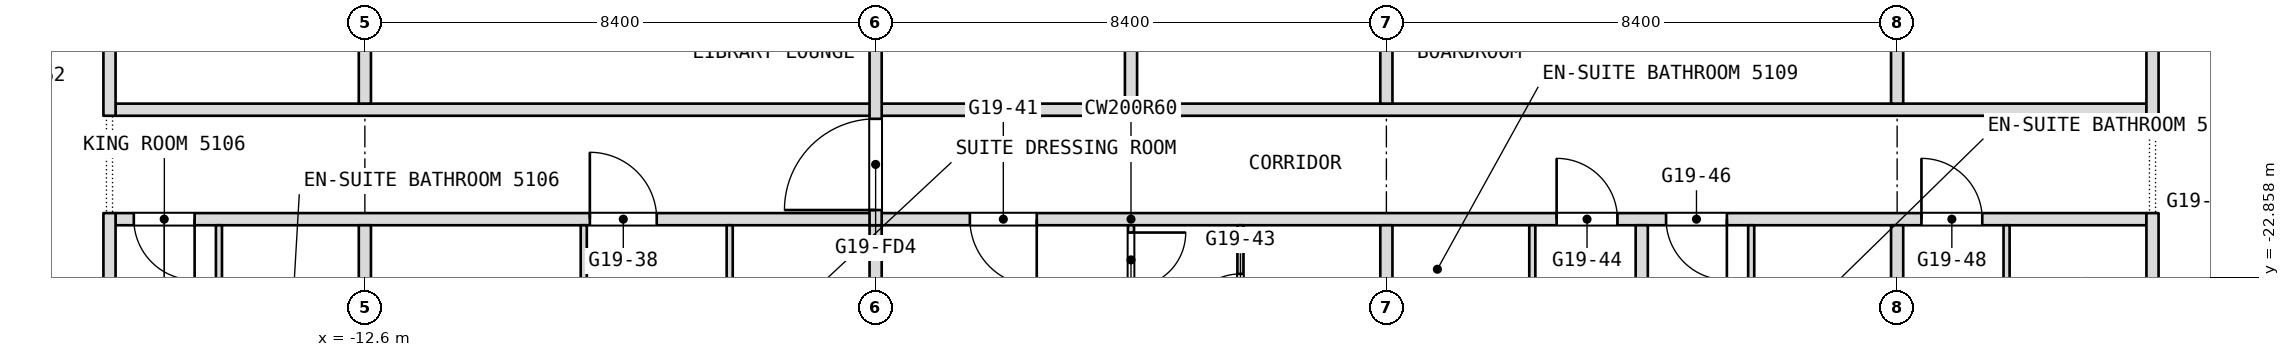
"""IFC4 building model, lengths in metres.
Left out: names, types, materials, properties, quantities, classifications, styles, units other than length and angle.
Written with IfcOpenShell. Run it as: python <this file> out.ifc"""

import sys

from ifc_helpers import new_model, si_unit, direction, frame, frame_2d, origin, place, context, subcontext, project, spatial, rectangle, extrude, element, fill, save


model = new_model("IFC4")
c1 = context("Model", 3, precision=1e-05, world=origin(), true_north=direction((0.0, 1.0)))
c2 = subcontext(c1, "Body", "Model", "MODEL_VIEW")
j1 = project(units=[si_unit("LENGTHUNIT", "METRE"), si_unit("PLANEANGLEUNIT", "RADIAN")], contexts=[c1])
p1 = place(None, origin())
s1 = spatial("IfcSite", under=j1, at=p1, CompositionType="ELEMENT")
p2 = place(p1, origin())
s2 = spatial("IfcBuilding", under=s1, at=p2, CompositionType="ELEMENT")
p3 = place(p2, frame((0.0, 0.0, 220.1)))
s3 = spatial("IfcBuildingStorey", under=s2, at=p3, CompositionType="ELEMENT", Elevation=220.1)
p4 = place(p3, frame((-16.7, -21.9, 0.0), z_axis=(0.0, 0.0, 1.0), x_axis=(1.0, 0.0, 0.0)))
e1 = element("IfcWall", 1, at=p4, inside=s3, PredefinedType="PARTITIONING", context=c2, shape_type="SweptSolid", body=[
    extrude(rectangle(XDim=33.4, YDim=0.2, at=frame_2d((16.7, 0.0))), origin(), (0.0, 0.0, 1.0), 3.34),
])
p5 = place(p4, frame((0.3, 0.0, 0.0)))
e2 = element("IfcOpeningElement", 2, at=p5, cuts=e1, PredefinedType="OPENING", context=c2, shape_type="SweptSolid", body=[
    extrude(rectangle(XDim=1.0, YDim=2.1, at=frame_2d((0.5, 1.05))), frame((0.0, 0.1, 0.0), z_axis=(0.0, -1.0, 0.0), x_axis=(1.0, 0.0, 0.0)), (0.0, 0.0, 1.0), 0.2),
])
p6 = place(p4, frame((7.8, 0.0, 0.0)))
e3 = element("IfcOpeningElement", 3, at=p6, cuts=e1, PredefinedType="OPENING", context=c2, shape_type="SweptSolid", body=[
    extrude(rectangle(XDim=1.1, YDim=2.1, at=frame_2d((0.55, 1.05))), frame((0.0, 0.1, 0.0), z_axis=(0.0, -1.0, 0.0), x_axis=(1.0, 0.0, 0.0)), (0.0, 0.0, 1.0), 0.2),
])
p7 = place(p4, frame((14.05, 0.0, 0.0)))
e4 = element("IfcOpeningElement", 4, at=p7, cuts=e1, PredefinedType="OPENING", context=c2, shape_type="SweptSolid", body=[
    extrude(rectangle(XDim=1.1, YDim=2.1, at=frame_2d((0.55, 1.05))), frame((0.0, 0.1, 0.0), z_axis=(0.0, -1.0, 0.0), x_axis=(1.0, 0.0, 0.0)), (0.0, 0.0, 1.0), 0.2),
])
p8 = place(p4, frame((23.7, 0.0, 0.0)))
e5 = element("IfcOpeningElement", 5, at=p8, cuts=e1, PredefinedType="OPENING", context=c2, shape_type="SweptSolid", body=[
    extrude(rectangle(XDim=1.0, YDim=2.1, at=frame_2d((0.5, 1.05))), frame((0.0, 0.1, 0.0), z_axis=(0.0, -1.0, 0.0), x_axis=(1.0, 0.0, 0.0)), (0.0, 0.0, 1.0), 0.2),
])
p9 = place(p4, frame((25.5, 0.0, 0.0)))
e6 = element("IfcOpeningElement", 6, at=p9, cuts=e1, PredefinedType="OPENING", context=c2, shape_type="SweptSolid", body=[
    extrude(rectangle(XDim=1.0, YDim=2.1, at=frame_2d((0.5, 1.05))), frame((0.0, 0.1, 0.0), z_axis=(0.0, -1.0, 0.0), x_axis=(1.0, 0.0, 0.0)), (0.0, 0.0, 1.0), 0.2),
])
p10 = place(p4, frame((29.7, 0.0, 0.0)))
e7 = element("IfcOpeningElement", 7, at=p10, cuts=e1, PredefinedType="OPENING", context=c2, shape_type="SweptSolid", body=[
    extrude(rectangle(XDim=1.0, YDim=2.1, at=frame_2d((0.5, 1.05))), frame((0.0, 0.1, 0.0), z_axis=(0.0, -1.0, 0.0), x_axis=(1.0, 0.0, 0.0)), (0.0, 0.0, 1.0), 0.2),
])
p11 = place(p3, frame((-16.7, -20.1, 0.0), z_axis=(0.0, 0.0, 1.0), x_axis=(1.0, 0.0, 0.0)))
e8 = element("IfcWall", 8, at=p11, inside=s3, PredefinedType="PARTITIONING", context=c2, shape_type="SweptSolid", body=[
    extrude(rectangle(XDim=33.4, YDim=0.2, at=frame_2d((16.7, 0.0))), origin(), (0.0, 0.0, 1.0), 3.34),
])
p12 = place(p3, frame((16.8, -27.229, 0.0), z_axis=(0.0, 0.0, 1.0), x_axis=(0.0, 1.0, 0.0)))
e9 = element("IfcWall", 9, at=p12, inside=s3, PredefinedType="PARTITIONING", context=c2, shape_type="SweptSolid", body=[
    extrude(rectangle(XDim=5.429, YDim=0.2, at=frame_2d((2.714, 0.0))), origin(), (0.0, 0.0, 1.0), 3.34),
])
p13 = place(p3, frame((16.8, -20.2, 0.0), z_axis=(0.0, 0.0, 1.0), x_axis=(0.0, 1.0, 0.0)))
e10 = element("IfcWall", 10, at=p13, inside=s3, PredefinedType="PARTITIONING", context=c2, shape_type="SweptSolid", body=[
    extrude(rectangle(XDim=6.8, YDim=0.2, at=frame_2d((3.4, 0.0))), origin(), (0.0, 0.0, 1.0), 3.34),
])
p14 = place(p3, frame((14.4, -24.95, 0.0), z_axis=(0.0, 0.0, 1.0), x_axis=(0.0, 1.0, 0.0)))
e11 = element("IfcWall", 11, at=p14, inside=s3, PredefinedType="PARTITIONING", context=c2, shape_type="SweptSolid", body=[
    extrude(rectangle(XDim=2.95, YDim=0.1, at=frame_2d((1.475, 0.0))), origin(), (0.0, 0.0, 1.0), 3.34),
])
p15 = place(p3, frame((12.6, -28.343, 0.0), z_axis=(0.0, 0.0, 1.0), x_axis=(0.0, 1.0, 0.0)))
e12 = element("IfcWall", 12, at=p15, inside=s3, PredefinedType="PARTITIONING", context=c2, shape_type="SweptSolid", body=[
    extrude(rectangle(XDim=6.343, YDim=0.2, at=frame_2d((3.171, 0.0))), origin(), (0.0, 0.0, 1.0), 3.34),
])
p16 = place(p3, frame((12.6, -20.0, 0.0), z_axis=(0.0, 0.0, 1.0), x_axis=(0.0, 1.0, 0.0)))
e13 = element("IfcWall", 13, at=p16, inside=s3, PredefinedType="PARTITIONING", context=c2, shape_type="SweptSolid", body=[
    extrude(rectangle(XDim=1.5, YDim=0.2, at=frame_2d((0.75, 0.0))), origin(), (0.0, 0.0, 1.0), 3.34),
])
p17 = place(p3, frame((10.2, -25.35, 0.0), z_axis=(0.0, 0.0, 1.0), x_axis=(0.0, 1.0, 0.0)))
e14 = element("IfcWall", 14, at=p17, inside=s3, PredefinedType="PARTITIONING", context=c2, shape_type="SweptSolid", body=[
    extrude(rectangle(XDim=3.35, YDim=0.1, at=frame_2d((1.675, 0.0))), origin(), (0.0, 0.0, 1.0), 3.34),
])
p18 = place(p3, frame((8.4, -28.9, 0.0), z_axis=(0.0, 0.0, 1.0), x_axis=(0.0, 1.0, 0.0)))
e15 = element("IfcWall", 15, at=p18, inside=s3, PredefinedType="PARTITIONING", context=c2, shape_type="SweptSolid", body=[
    extrude(rectangle(XDim=6.9, YDim=0.2, at=frame_2d((3.45, 0.0))), origin(), (0.0, 0.0, 1.0), 3.34),
])
p19 = place(p3, frame((6.6, -25.25, 0.0), z_axis=(0.0, 0.0, 1.0), x_axis=(0.0, 1.0, 0.0)))
e16 = element("IfcWall", 16, at=p19, inside=s3, PredefinedType="PARTITIONING", context=c2, shape_type="SweptSolid", body=[
    extrude(rectangle(XDim=3.25, YDim=0.1, at=frame_2d((1.625, 0.0))), origin(), (0.0, 0.0, 1.0), 3.34),
])
p20 = place(p19, frame((1.03, 0.0, 0.0)))
e17 = element("IfcOpeningElement", 17, at=p20, cuts=e16, PredefinedType="OPENING", context=c2, shape_type="SweptSolid", body=[
    extrude(rectangle(XDim=0.9, YDim=2.1, at=frame_2d((0.45, 1.05))), frame((0.0, 0.05, 0.0), z_axis=(0.0, -1.0, 0.0), x_axis=(1.0, 0.0, 0.0)), (0.0, 0.0, 1.0), 0.1),
])
p21 = place(p3, frame((4.2, -28.9, 0.0), z_axis=(0.0, 0.0, 1.0), x_axis=(0.0, 1.0, 0.0)))
e18 = element("IfcWall", 18, at=p21, inside=s3, PredefinedType="PARTITIONING", context=c2, shape_type="SweptSolid", body=[
    extrude(rectangle(XDim=6.9, YDim=0.2, at=frame_2d((3.45, 0.0))), origin(), (0.0, 0.0, 1.0), 3.34),
])
p22 = place(p3, frame((4.2, -20.0, 0.0), z_axis=(0.0, 0.0, 1.0), x_axis=(0.0, 1.0, 0.0)))
e19 = element("IfcWall", 19, at=p22, inside=s3, PredefinedType="PARTITIONING", context=c2, shape_type="SweptSolid", body=[
    extrude(rectangle(XDim=6.4, YDim=0.2, at=frame_2d((3.2, 0.0))), origin(), (0.0, 0.0, 1.0), 3.34),
])
p23 = place(p3, frame((1.8, -24.65, 0.0), z_axis=(0.0, 0.0, 1.0), x_axis=(0.0, 1.0, 0.0)))
e20 = element("IfcWall", 20, at=p23, inside=s3, PredefinedType="PARTITIONING", context=c2, shape_type="SweptSolid", body=[
    extrude(rectangle(XDim=2.65, YDim=0.1, at=frame_2d((1.325, 0.0))), origin(), (0.0, 0.0, 1.0), 3.34),
])
p24 = place(p23, frame((0.95, 0.0, 0.0)))
e21 = element("IfcOpeningElement", 21, at=p24, cuts=e20, PredefinedType="OPENING", context=c2, shape_type="SweptSolid", body=[
    extrude(rectangle(XDim=0.9, YDim=2.1, at=frame_2d((0.45, 1.05))), frame((0.0, 0.05, 0.0), z_axis=(0.0, -1.0, 0.0), x_axis=(1.0, 0.0, 0.0)), (0.0, 0.0, 1.0), 0.1),
])
p25 = place(p3, frame((0.0, -28.9, 0.0), z_axis=(0.0, 0.0, 1.0), x_axis=(0.0, 1.0, 0.0)))
e22 = element("IfcWall", 22, at=p25, inside=s3, PredefinedType="PARTITIONING", context=c2, shape_type="SweptSolid", body=[
    extrude(rectangle(XDim=6.9, YDim=0.1, at=frame_2d((3.45, 0.0))), origin(), (0.0, 0.0, 1.0), 3.34),
])
p26 = place(p25, frame((5.88, 0.0, 0.0)))
e23 = element("IfcOpeningElement", 23, at=p26, cuts=e22, PredefinedType="OPENING", context=c2, shape_type="SweptSolid", body=[
    extrude(rectangle(XDim=0.9, YDim=2.1, at=frame_2d((0.45, 1.05))), frame((0.0, 0.05, 0.0), z_axis=(0.0, -1.0, 0.0), x_axis=(1.0, 0.0, 0.0)), (0.0, 0.0, 1.0), 0.1),
])
p27 = place(p3, frame((0.0, -20.0, 0.0), z_axis=(0.0, 0.0, 1.0), x_axis=(0.0, 1.0, 0.0)))
e24 = element("IfcWall", 24, at=p27, inside=s3, PredefinedType="PARTITIONING", context=c2, shape_type="SweptSolid", body=[
    extrude(rectangle(XDim=6.4, YDim=0.2, at=frame_2d((3.2, 0.0))), origin(), (0.0, 0.0, 1.0), 3.34),
])
p28 = place(p3, frame((-4.2, -28.9, 0.0), z_axis=(0.0, 0.0, 1.0), x_axis=(0.0, 1.0, 0.0)))
e25 = element("IfcWall", 25, at=p28, inside=s3, PredefinedType="PARTITIONING", context=c2, shape_type="SweptSolid", body=[
    extrude(rectangle(XDim=6.9, YDim=0.2, at=frame_2d((3.45, 0.0))), origin(), (0.0, 0.0, 1.0), 3.34),
])
p29 = place(p3, frame((-4.2, -22.0, 0.0), z_axis=(0.0, 0.0, 1.0), x_axis=(0.0, 1.0, 0.0)))
e26 = element("IfcWall", 26, at=p29, inside=s3, PredefinedType="PARTITIONING", context=c2, shape_type="SweptSolid", body=[
    extrude(rectangle(XDim=8.4, YDim=0.2, at=frame_2d((4.2, 0.0))), origin(), (0.0, 0.0, 1.0), 3.34),
])
p30 = place(p29, frame((0.25, 0.0, 0.0)))
e27 = element("IfcOpeningElement", 27, at=p30, cuts=e26, PredefinedType="OPENING", context=c2, shape_type="SweptSolid", body=[
    extrude(rectangle(XDim=1.5, YDim=2.1, at=frame_2d((0.75, 1.05))), frame((0.0, 0.1, 0.0), z_axis=(0.0, -1.0, 0.0), x_axis=(1.0, 0.0, 0.0)), (0.0, 0.0, 1.0), 0.2),
])
p31 = place(p3, frame((-6.6, -25.55, 0.0), z_axis=(0.0, 0.0, 1.0), x_axis=(0.0, 1.0, 0.0)))
e28 = element("IfcWall", 28, at=p31, inside=s3, PredefinedType="PARTITIONING", context=c2, shape_type="SweptSolid", body=[
    extrude(rectangle(XDim=3.55, YDim=0.1, at=frame_2d((1.775, 0.0))), origin(), (0.0, 0.0, 1.0), 3.34),
])
p32 = place(p3, frame((-9.0, -25.45, 0.0), z_axis=(0.0, 0.0, 1.0), x_axis=(0.0, 1.0, 0.0)))
e29 = element("IfcWall", 29, at=p32, inside=s3, PredefinedType="PARTITIONING", context=c2, shape_type="SweptSolid", body=[
    extrude(rectangle(XDim=3.45, YDim=0.1, at=frame_2d((1.725, 0.0))), origin(), (0.0, 0.0, 1.0), 3.34),
])
p33 = place(p32, frame((0.94, 0.0, 0.0)))
e30 = element("IfcOpeningElement", 30, at=p33, cuts=e29, PredefinedType="OPENING", context=c2, shape_type="SweptSolid", body=[
    extrude(rectangle(XDim=0.9, YDim=2.1, at=frame_2d((0.45, 1.05))), frame((0.0, 0.05, 0.0), z_axis=(0.0, -1.0, 0.0), x_axis=(1.0, 0.0, 0.0)), (0.0, 0.0, 1.0), 0.1),
])
p34 = place(p3, frame((-12.6, -28.343, 0.0), z_axis=(0.0, 0.0, 1.0), x_axis=(0.0, 1.0, 0.0)))
e31 = element("IfcWall", 31, at=p34, inside=s3, PredefinedType="PARTITIONING", context=c2, shape_type="SweptSolid", body=[
    extrude(rectangle(XDim=6.343, YDim=0.2, at=frame_2d((3.171, 0.0))), origin(), (0.0, 0.0, 1.0), 3.34),
])
p35 = place(p3, frame((-12.6, -20.0, 0.0), z_axis=(0.0, 0.0, 1.0), x_axis=(0.0, 1.0, 0.0)))
e32 = element("IfcWall", 32, at=p35, inside=s3, PredefinedType="PARTITIONING", context=c2, shape_type="SweptSolid", body=[
    extrude(rectangle(XDim=1.5, YDim=0.2, at=frame_2d((0.75, 0.0))), origin(), (0.0, 0.0, 1.0), 3.34),
])
p36 = place(p3, frame((-15.0, -25.85, 0.0), z_axis=(0.0, 0.0, 1.0), x_axis=(0.0, 1.0, 0.0)))
e33 = element("IfcWall", 33, at=p36, inside=s3, PredefinedType="PARTITIONING", context=c2, shape_type="SweptSolid", body=[
    extrude(rectangle(XDim=3.85, YDim=0.1, at=frame_2d((1.925, 0.0))), origin(), (0.0, 0.0, 1.0), 3.34),
])
p37 = place(p3, frame((-16.8, -27.229, 0.0), z_axis=(0.0, 0.0, 1.0), x_axis=(0.0, 1.0, 0.0)))
e34 = element("IfcWall", 34, at=p37, inside=s3, PredefinedType="PARTITIONING", context=c2, shape_type="SweptSolid", body=[
    extrude(rectangle(XDim=5.429, YDim=0.2, at=frame_2d((2.714, 0.0))), origin(), (0.0, 0.0, 1.0), 3.34),
])
p38 = place(p3, frame((-16.8, -20.2, 0.0), z_axis=(0.0, 0.0, 1.0), x_axis=(0.0, 1.0, 0.0)))
e35 = element("IfcWall", 35, at=p38, inside=s3, PredefinedType="PARTITIONING", context=c2, shape_type="SweptSolid", body=[
    extrude(rectangle(XDim=6.8, YDim=0.2, at=frame_2d((3.4, 0.0))), origin(), (0.0, 0.0, 1.0), 3.34),
])
p39 = place(p5, origin())
e36 = element("IfcDoor", 36, at=p39, inside=s3, OperationType="SINGLE_SWING_RIGHT", PredefinedType="DOOR", context=c2, shape_type="SweptSolid", body=[
    extrude(rectangle(XDim=1.0, YDim=2.1, at=frame_2d((0.5, 1.05))), frame((0.0, 0.025, 0.0), z_axis=(0.0, -1.0, 0.0), x_axis=(1.0, 0.0, 0.0)), (0.0, 0.0, 1.0), 0.05),
])
fill(e2, e36)
p40 = place(p6, origin())
e37 = element("IfcDoor", 37, at=p40, inside=s3, OperationType="SINGLE_SWING_RIGHT", PredefinedType="DOOR", context=c2, shape_type="SweptSolid", body=[
    extrude(rectangle(XDim=1.1, YDim=2.1, at=frame_2d((0.55, 1.05))), frame((0.0, 0.025, 0.0), z_axis=(0.0, -1.0, 0.0), x_axis=(1.0, 0.0, 0.0)), (0.0, 0.0, 1.0), 0.05),
])
fill(e3, e37)
p41 = place(p7, origin())
e38 = element("IfcDoor", 38, at=p41, inside=s3, OperationType="SINGLE_SWING_LEFT", PredefinedType="DOOR", context=c2, shape_type="SweptSolid", body=[
    extrude(rectangle(XDim=1.1, YDim=2.1, at=frame_2d((0.55, 1.05))), frame((0.0, 0.025, 0.0), z_axis=(0.0, -1.0, 0.0), x_axis=(1.0, 0.0, 0.0)), (0.0, 0.0, 1.0), 0.05),
])
fill(e4, e38)
p42 = place(p8, origin())
e39 = element("IfcDoor", 39, at=p42, inside=s3, OperationType="SINGLE_SWING_RIGHT", PredefinedType="DOOR", context=c2, shape_type="SweptSolid", body=[
    extrude(rectangle(XDim=1.0, YDim=2.1, at=frame_2d((0.5, 1.05))), frame((0.0, 0.025, 0.0), z_axis=(0.0, -1.0, 0.0), x_axis=(1.0, 0.0, 0.0)), (0.0, 0.0, 1.0), 0.05),
])
fill(e5, e39)
p43 = place(p9, origin())
e40 = element("IfcDoor", 40, at=p43, inside=s3, OperationType="SINGLE_SWING_RIGHT", PredefinedType="DOOR", context=c2, shape_type="SweptSolid", body=[
    extrude(rectangle(XDim=1.0, YDim=2.1, at=frame_2d((0.5, 1.05))), frame((0.0, 0.025, 0.0), z_axis=(0.0, -1.0, 0.0), x_axis=(1.0, 0.0, 0.0)), (0.0, 0.0, 1.0), 0.05),
])
fill(e6, e40)
p44 = place(p10, origin())
e41 = element("IfcDoor", 41, at=p44, inside=s3, OperationType="SINGLE_SWING_RIGHT", PredefinedType="DOOR", context=c2, shape_type="SweptSolid", body=[
    extrude(rectangle(XDim=1.0, YDim=2.1, at=frame_2d((0.5, 1.05))), frame((0.0, 0.025, 0.0), z_axis=(0.0, -1.0, 0.0), x_axis=(1.0, 0.0, 0.0)), (0.0, 0.0, 1.0), 0.05),
])
fill(e7, e41)
p45 = place(p24, origin())
e42 = element("IfcDoor", 42, at=p45, inside=s3, OperationType="SINGLE_SWING_LEFT", PredefinedType="DOOR", context=c2, shape_type="SweptSolid", body=[
    extrude(rectangle(XDim=0.9, YDim=2.1, at=frame_2d((0.45, 1.05))), frame((0.0, 0.025, 0.0), z_axis=(0.0, -1.0, 0.0), x_axis=(1.0, 0.0, 0.0)), (0.0, 0.0, 1.0), 0.05),
])
fill(e21, e42)
p46 = place(p26, origin())
e43 = element("IfcDoor", 43, at=p46, inside=s3, OperationType="SINGLE_SWING_LEFT", PredefinedType="DOOR", context=c2, shape_type="SweptSolid", body=[
    extrude(rectangle(XDim=0.9, YDim=2.1, at=frame_2d((0.45, 1.05))), frame((0.0, 0.025, 0.0), z_axis=(0.0, -1.0, 0.0), x_axis=(1.0, 0.0, 0.0)), (0.0, 0.0, 1.0), 0.05),
])
fill(e23, e43)
p47 = place(p30, origin())
e44 = element("IfcDoor", 44, at=p47, inside=s3, OperationType="DOUBLE_DOOR_DOUBLE_SWING", PredefinedType="DOOR", context=c2, shape_type="SweptSolid", body=[
    extrude(rectangle(XDim=1.5, YDim=2.1, at=frame_2d((0.75, 1.05))), frame((0.0, 0.025, 0.0), z_axis=(0.0, -1.0, 0.0), x_axis=(1.0, 0.0, 0.0)), (0.0, 0.0, 1.0), 0.05),
])
fill(e27, e44)
save(model, sys.argv[1])
